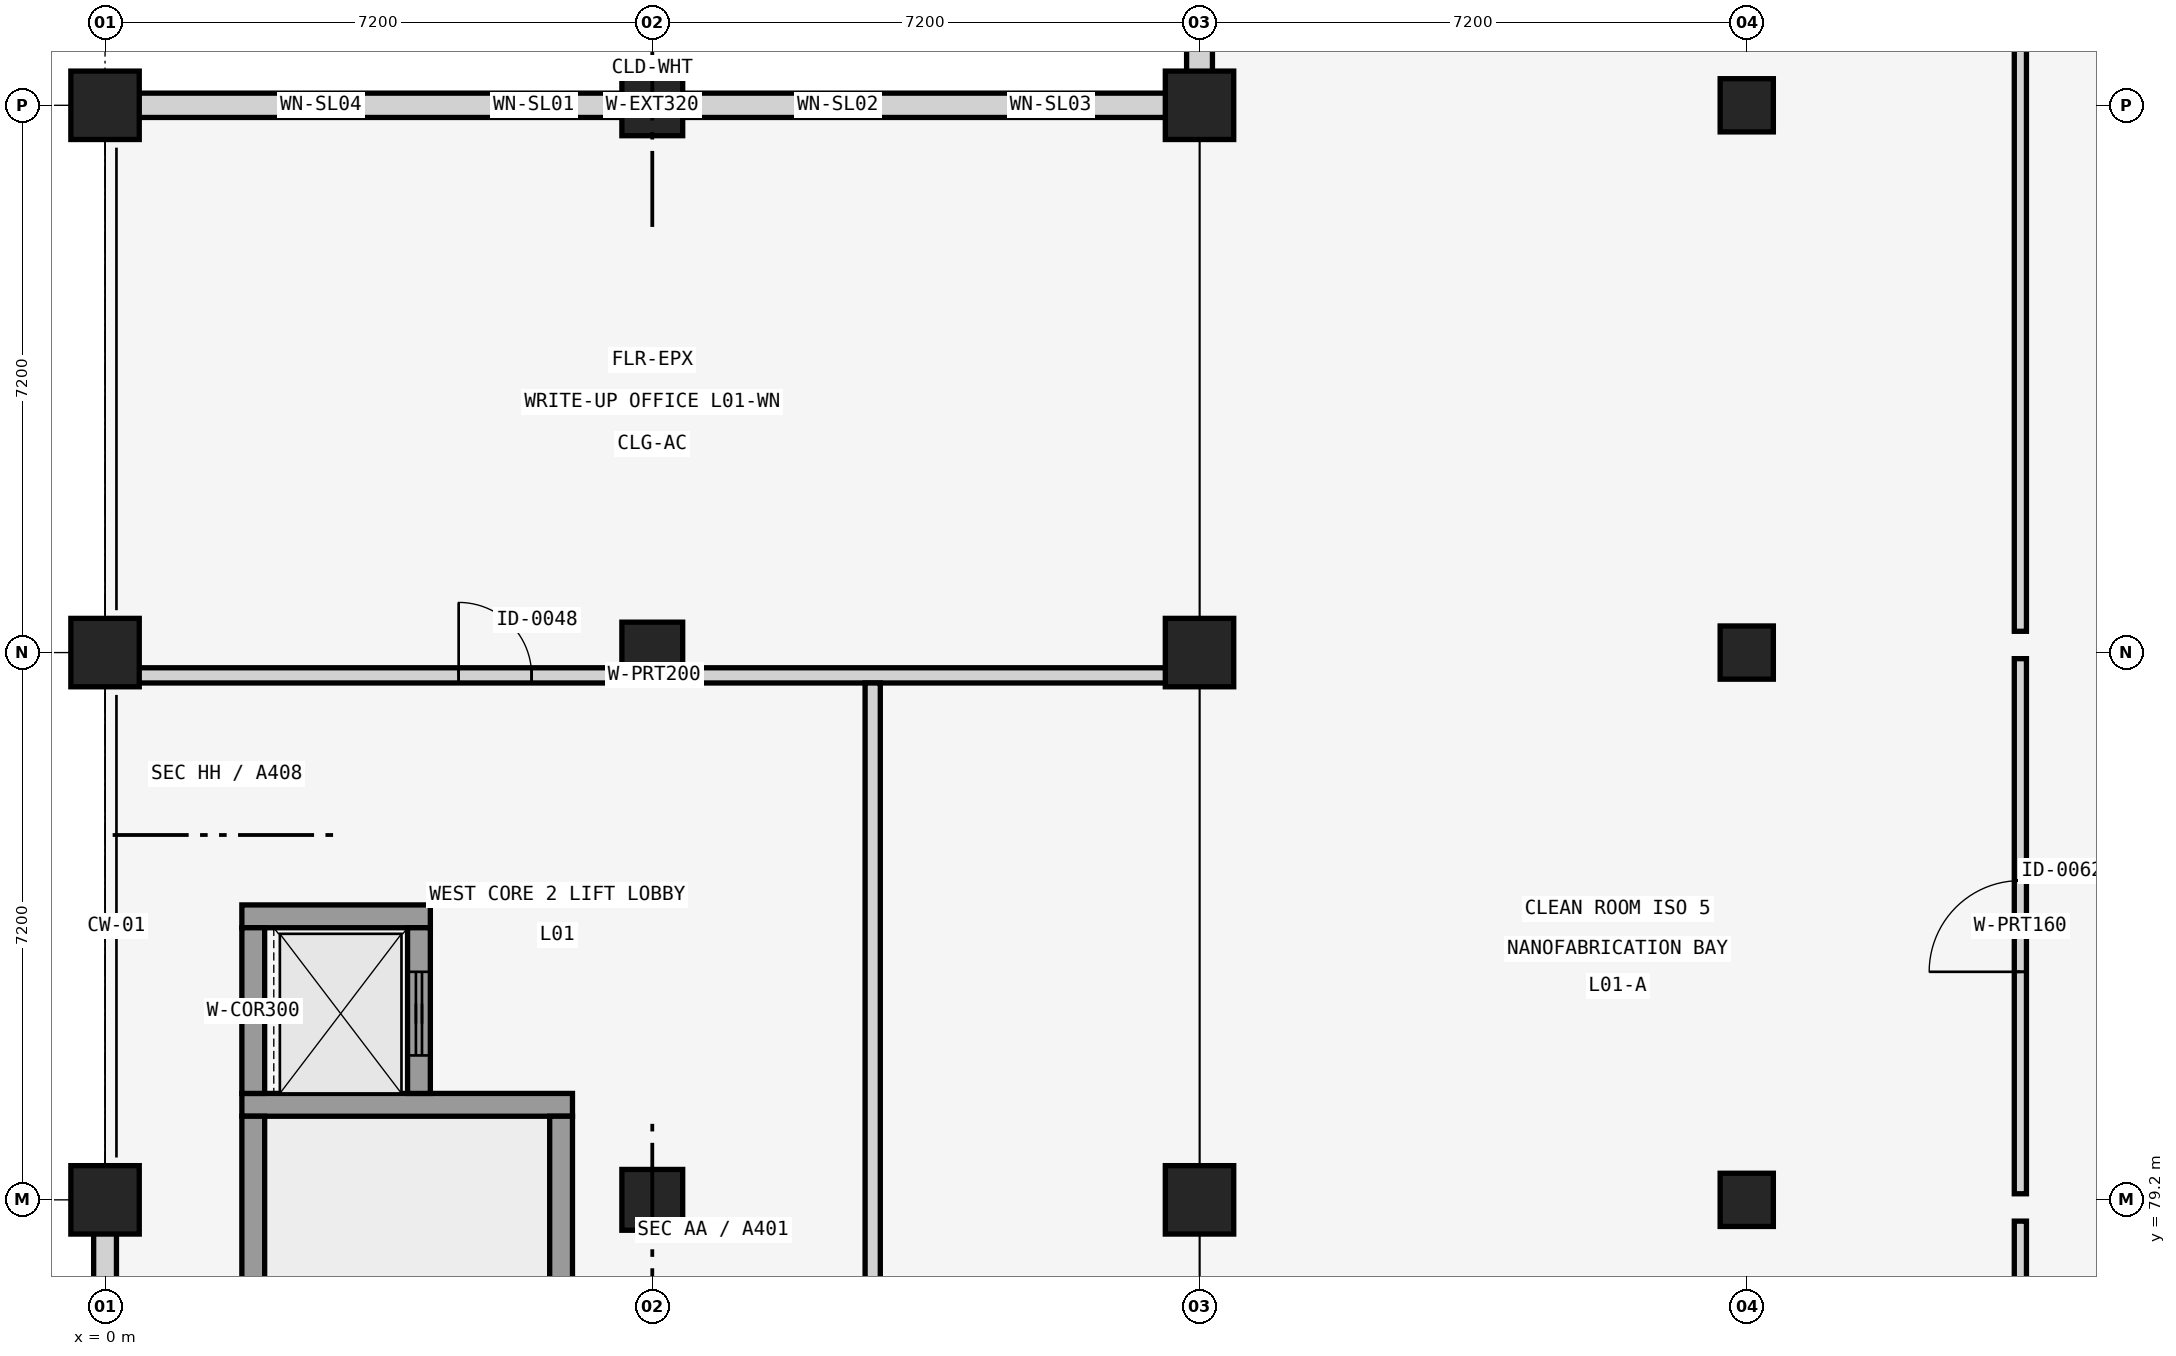
"""IFC4 building model, lengths in metres.
Left out: names, types, materials, properties, quantities, classifications, styles, units other than length and angle.
Written with IfcOpenShell. Run it as: python <this file> out.ifc"""

import sys

from ifc_helpers import new_model, si_unit, direction, frame, frame_2d, origin, origin_2d, place, context, subcontext, project, spatial, rectangle, extrude, element, fill, save


model = new_model("IFC4")
c1 = context("Model", 3, precision=1e-05, world=origin(), true_north=direction((0.0, 1.0)))
c2 = subcontext(c1, "Body", "Model", "MODEL_VIEW")
j1 = project(units=[si_unit("LENGTHUNIT", "METRE"), si_unit("PLANEANGLEUNIT", "RADIAN")], contexts=[c1])
p1 = place(None, origin())
s1 = spatial("IfcSite", under=j1, at=p1, CompositionType="ELEMENT")
p2 = place(p1, origin())
s2 = spatial("IfcBuilding", under=s1, at=p2, CompositionType="ELEMENT")
p3 = place(p2, frame((0.0, 0.0, 4.8)))
s3 = spatial("IfcBuildingStorey", under=s2, at=p3, CompositionType="ELEMENT", Elevation=4.8)
for number, where, z_axis, x_axis in (
    (1, (0.0, 79.2, 0.0), (0.0, 0.0, 1.0), (1.0, 0.0, 0.0)),
    (2, (0.0, 86.4, 0.0), (0.0, 0.0, 1.0), (1.0, 0.0, 0.0)),
    (3, (0.0, 93.6, 0.0), (0.0, 0.0, 1.0), (1.0, 0.0, 0.0)),
):
    element("IfcColumn", number, at=place(p3, frame(where, z_axis=z_axis, x_axis=x_axis)), inside=s3, PredefinedType="COLUMN", context=c2, shape_type="SweptSolid", body=[
        extrude(rectangle(XDim=0.9, YDim=0.9, at=origin_2d()), origin(), (0.0, 0.0, 1.0), 4.16),
    ])
for number, where, z_axis, x_axis in (
    (4, (7.2, 79.2, 0.0), (0.0, 0.0, 1.0), (1.0, 0.0, 0.0)),
    (5, (7.2, 86.4, 0.0), (0.0, 0.0, 1.0), (1.0, 0.0, 0.0)),
    (6, (7.2, 93.6, 0.0), (0.0, 0.0, 1.0), (1.0, 0.0, 0.0)),
):
    element("IfcColumn", number, at=place(p3, frame(where, z_axis=z_axis, x_axis=x_axis)), inside=s3, PredefinedType="COLUMN", context=c2, shape_type="SweptSolid", body=[
        extrude(rectangle(XDim=0.8, YDim=0.8, at=origin_2d()), origin(), (0.0, 0.0, 1.0), 4.16),
    ])
for number, where, z_axis, x_axis in (
    (7, (14.4, 79.2, 0.0), (0.0, 0.0, 1.0), (1.0, 0.0, 0.0)),
    (8, (14.4, 86.4, 0.0), (0.0, 0.0, 1.0), (1.0, 0.0, 0.0)),
    (9, (14.4, 93.6, 0.0), (0.0, 0.0, 1.0), (1.0, 0.0, 0.0)),
):
    element("IfcColumn", number, at=place(p3, frame(where, z_axis=z_axis, x_axis=x_axis)), inside=s3, PredefinedType="COLUMN", context=c2, shape_type="SweptSolid", body=[
        extrude(rectangle(XDim=0.9, YDim=0.9, at=origin_2d()), origin(), (0.0, 0.0, 1.0), 4.16),
    ])
for number, where, z_axis, x_axis in (
    (10, (21.6, 79.2, 0.0), (0.0, 0.0, 1.0), (1.0, 0.0, 0.0)),
    (11, (21.6, 86.4, 0.0), (0.0, 0.0, 1.0), (1.0, 0.0, 0.0)),
    (12, (21.6, 93.6, 0.0), (0.0, 0.0, 1.0), (1.0, 0.0, 0.0)),
):
    element("IfcColumn", number, at=place(p3, frame(where, z_axis=z_axis, x_axis=x_axis)), inside=s3, PredefinedType="COLUMN", context=c2, shape_type="SweptSolid", body=[
        extrude(rectangle(XDim=0.7, YDim=0.7, at=origin_2d()), origin(), (0.0, 0.0, 1.0), 4.16),
    ])
p4 = place(p3, frame((0.44, 93.6, 0.0), z_axis=(0.0, 0.0, 1.0), x_axis=(1.0, 0.0, 0.0)))
e13 = element("IfcWall", 13, at=p4, inside=s3, PredefinedType="SOLIDWALL", context=c2, shape_type="SweptSolid", body=[
    extrude(rectangle(XDim=13.52, YDim=0.32, at=frame_2d((6.76, 0.0))), origin(), (0.0, 0.0, 1.0), 3.42),
])
p5 = place(p4, frame((2.175, 0.0, 0.85)))
e14 = element("IfcOpeningElement", 14, at=p5, cuts=e13, PredefinedType="OPENING", context=c2, shape_type="SweptSolid", body=[
    extrude(rectangle(XDim=0.45, YDim=2.1, at=frame_2d((0.225, 1.05))), frame((0.0, 0.17, 0.0), z_axis=(0.0, -1.0, 0.0), x_axis=(1.0, 0.0, 0.0)), (0.0, 0.0, 1.0), 0.34),
])
p6 = place(p4, frame((4.975, 0.0, 0.85)))
e15 = element("IfcOpeningElement", 15, at=p6, cuts=e13, PredefinedType="OPENING", context=c2, shape_type="SweptSolid", body=[
    extrude(rectangle(XDim=0.45, YDim=2.4, at=frame_2d((0.225, 1.2))), frame((0.0, 0.17, 0.0), z_axis=(0.0, -1.0, 0.0), x_axis=(1.0, 0.0, 0.0)), (0.0, 0.0, 1.0), 0.34),
])
p7 = place(p4, frame((8.95, 0.0, 0.85)))
e16 = element("IfcOpeningElement", 16, at=p7, cuts=e13, PredefinedType="OPENING", context=c2, shape_type="SweptSolid", body=[
    extrude(rectangle(XDim=0.5, YDim=2.4, at=frame_2d((0.25, 1.2))), frame((0.0, 0.17, 0.0), z_axis=(0.0, -1.0, 0.0), x_axis=(1.0, 0.0, 0.0)), (0.0, 0.0, 1.0), 0.34),
])
p8 = place(p4, frame((11.725, 0.0, 0.85)))
e17 = element("IfcOpeningElement", 17, at=p8, cuts=e13, PredefinedType="OPENING", context=c2, shape_type="SweptSolid", body=[
    extrude(rectangle(XDim=0.55, YDim=2.2, at=frame_2d((0.275, 1.1))), frame((0.0, 0.17, 0.0), z_axis=(0.0, -1.0, 0.0), x_axis=(1.0, 0.0, 0.0)), (0.0, 0.0, 1.0), 0.34),
])
p9 = place(p3, frame((0.0, 72.44, 0.0), z_axis=(0.0, 0.0, 1.0), x_axis=(0.0, 1.0, 0.0)))
e18 = element("IfcWall", 18, at=p9, inside=s3, PredefinedType="SOLIDWALL", context=c2, shape_type="SweptSolid", body=[
    extrude(rectangle(XDim=6.32, YDim=0.3, at=frame_2d((3.16, 0.0))), origin(), (0.0, 0.0, 1.0), 3.21),
])
p10 = place(p9, frame((2.935, 0.0, 0.65)))
e19 = element("IfcOpeningElement", 19, at=p10, cuts=e18, PredefinedType="OPENING", context=c2, shape_type="SweptSolid", body=[
    extrude(rectangle(XDim=0.45, YDim=2.4, at=frame_2d((0.225, 1.2))), frame((0.0, 0.16, 0.0), z_axis=(0.0, -1.0, 0.0), x_axis=(1.0, 0.0, 0.0)), (0.0, 0.0, 1.0), 0.32),
])
p11 = place(p3, frame((14.4, 94.04, 0.0), z_axis=(0.0, 0.0, 1.0), x_axis=(0.0, 1.0, 0.0)))
e20 = element("IfcWall", 20, at=p11, inside=s3, PredefinedType="SOLIDWALL", context=c2, shape_type="SweptSolid", body=[
    extrude(rectangle(XDim=6.42, YDim=0.34, at=frame_2d((3.21, 0.0))), origin(), (0.0, 0.0, 1.0), 3.21),
])
p12 = place(p11, frame((0.598, 0.0, 1.0)))
e21 = element("IfcOpeningElement", 21, at=p12, cuts=e20, PredefinedType="OPENING", context=c2, shape_type="SweptSolid", body=[
    extrude(rectangle(XDim=2.4, YDim=1.5, at=frame_2d((1.2, 0.75))), frame((0.0, 0.18, 0.0), z_axis=(0.0, -1.0, 0.0), x_axis=(1.0, 0.0, 0.0)), (0.0, 0.0, 1.0), 0.36),
])
p13 = place(p11, frame((3.872, 0.0, 1.0)))
e22 = element("IfcOpeningElement", 22, at=p13, cuts=e20, PredefinedType="OPENING", context=c2, shape_type="SweptSolid", body=[
    extrude(rectangle(XDim=1.5, YDim=1.65, at=frame_2d((0.75, 0.825))), frame((0.0, 0.18, 0.0), z_axis=(0.0, -1.0, 0.0), x_axis=(1.0, 0.0, 0.0)), (0.0, 0.0, 1.0), 0.36),
])
p14 = place(p3, frame((1.8, 80.45, 0.0), z_axis=(0.0, 0.0, 1.0), x_axis=(1.0, 0.0, 0.0)))
e23 = element("IfcWall", 23, at=p14, inside=s3, PredefinedType="SHEAR", context=c2, shape_type="SweptSolid", body=[
    extrude(rectangle(XDim=4.35, YDim=0.3, at=frame_2d((2.175, 0.0))), origin(), (0.0, 0.0, 1.0), 3.81),
])
p15 = place(p3, frame((1.95, 72.5, 0.0), z_axis=(0.0, 0.0, 1.0), x_axis=(0.0, 1.0, 0.0)))
e24 = element("IfcWall", 24, at=p15, inside=s3, PredefinedType="SHEAR", context=c2, shape_type="SweptSolid", body=[
    extrude(rectangle(XDim=7.8, YDim=0.3, at=frame_2d((3.9, 0.0))), origin(), (0.0, 0.0, 1.0), 3.81),
])
p16 = place(p3, frame((6.0, 72.5, 0.0), z_axis=(0.0, 0.0, 1.0), x_axis=(0.0, 1.0, 0.0)))
e25 = element("IfcWall", 25, at=p16, inside=s3, PredefinedType="SHEAR", context=c2, shape_type="SweptSolid", body=[
    extrude(rectangle(XDim=7.8, YDim=0.3, at=frame_2d((3.9, 0.0))), origin(), (0.0, 0.0, 1.0), 3.81),
])
p17 = place(p16, frame((0.4, 0.0, 0.0)))
e26 = element("IfcOpeningElement", 26, at=p17, cuts=e25, PredefinedType="OPENING", context=c2, shape_type="SweptSolid", body=[
    extrude(rectangle(XDim=1.15, YDim=2.2, at=frame_2d((0.575, 1.1))), frame((0.0, 0.16, 0.0), z_axis=(0.0, -1.0, 0.0), x_axis=(1.0, 0.0, 0.0)), (0.0, 0.0, 1.0), 0.32),
])
p18 = place(p3, frame((1.8, 82.93, 0.0), z_axis=(0.0, 0.0, 1.0), x_axis=(1.0, 0.0, 0.0)))
e27 = element("IfcWall", 27, at=p18, inside=s3, PredefinedType="SHEAR", context=c2, shape_type="SweptSolid", body=[
    extrude(rectangle(XDim=2.48, YDim=0.3, at=frame_2d((1.24, 0.0))), origin(), (0.0, 0.0, 1.0), 3.81),
])
p19 = place(p3, frame((1.95, 80.6, 0.0), z_axis=(0.0, 0.0, 1.0), x_axis=(0.0, 1.0, 0.0)))
e28 = element("IfcWall", 28, at=p19, inside=s3, PredefinedType="SHEAR", context=c2, shape_type="SweptSolid", body=[
    extrude(rectangle(XDim=2.18, YDim=0.3, at=frame_2d((1.09, 0.0))), origin(), (0.0, 0.0, 1.0), 3.81),
])
p20 = place(p3, frame((4.13, 80.6, 0.0), z_axis=(0.0, 0.0, 1.0), x_axis=(0.0, 1.0, 0.0)))
e29 = element("IfcWall", 29, at=p20, inside=s3, PredefinedType="SHEAR", context=c2, shape_type="SweptSolid", body=[
    extrude(rectangle(XDim=2.18, YDim=0.3, at=frame_2d((1.09, 0.0))), origin(), (0.0, 0.0, 1.0), 3.81),
])
p21 = place(p20, frame((0.5, 0.0, 0.0)))
e30 = element("IfcOpeningElement", 30, at=p21, cuts=e29, PredefinedType="OPENING", context=c2, shape_type="SweptSolid", body=[
    extrude(rectangle(XDim=1.1, YDim=2.2, at=frame_2d((0.55, 1.1))), frame((0.0, 0.16, 0.0), z_axis=(0.0, -1.0, 0.0), x_axis=(1.0, 0.0, 0.0)), (0.0, 0.0, 1.0), 0.32),
])
p22 = place(p3, frame((0.25, 86.1, 0.0), z_axis=(0.0, 0.0, 1.0), x_axis=(1.0, 0.0, 0.0)))
e31 = element("IfcWall", 31, at=p22, inside=s3, PredefinedType="PARTITIONING", context=c2, shape_type="SweptSolid", body=[
    extrude(rectangle(XDim=13.95, YDim=0.2, at=frame_2d((6.975, 0.0))), origin(), (0.0, 0.0, 1.0), 3.21),
])
p23 = place(p22, frame((4.403, 0.0, 0.0)))
e32 = element("IfcOpeningElement", 32, at=p23, cuts=e31, PredefinedType="OPENING", context=c2, shape_type="SweptSolid", body=[
    extrude(rectangle(XDim=0.96, YDim=2.15, at=frame_2d((0.48, 1.075))), frame((0.0, 0.11, 0.0), z_axis=(0.0, -1.0, 0.0), x_axis=(1.0, 0.0, 0.0)), (0.0, 0.0, 1.0), 0.22),
])
p24 = place(p3, frame((10.1, 68.275, 0.0), z_axis=(0.0, 0.0, 1.0), x_axis=(0.0, 1.0, 0.0)))
e33 = element("IfcWall", 33, at=p24, inside=s3, PredefinedType="PARTITIONING", context=c2, shape_type="SweptSolid", body=[
    extrude(rectangle(XDim=17.725, YDim=0.2, at=frame_2d((8.863, 0.0))), origin(), (0.0, 0.0, 1.0), 3.21),
])
p25 = place(p24, frame((7.988, 0.0, 0.0)))
e34 = element("IfcOpeningElement", 34, at=p25, cuts=e33, PredefinedType="OPENING", context=c2, shape_type="SweptSolid", body=[
    extrude(rectangle(XDim=1.75, YDim=2.25, at=frame_2d((0.875, 1.125))), frame((0.0, 0.11, 0.0), z_axis=(0.0, -1.0, 0.0), x_axis=(1.0, 0.0, 0.0)), (0.0, 0.0, 1.0), 0.22),
])
p26 = place(p3, frame((25.2, 65.18, 0.0), z_axis=(0.0, 0.0, 1.0), x_axis=(0.0, 1.0, 0.0)))
e35 = element("IfcWall", 35, at=p26, inside=s3, PredefinedType="PARTITIONING", context=c2, shape_type="SweptSolid", body=[
    extrude(rectangle(XDim=13.74, YDim=0.16, at=frame_2d((6.87, 0.0))), origin(), (0.0, 0.0, 1.0), 3.11),
])
p27 = place(p26, frame((6.37, 0.0, 0.0)))
e36 = element("IfcOpeningElement", 36, at=p27, cuts=e35, PredefinedType="OPENING", context=c2, shape_type="SweptSolid", body=[
    extrude(rectangle(XDim=1.0, YDim=2.15, at=frame_2d((0.5, 1.075))), frame((0.0, 0.09, 0.0), z_axis=(0.0, -1.0, 0.0), x_axis=(1.0, 0.0, 0.0)), (0.0, 0.0, 1.0), 0.18),
])
p28 = place(p3, frame((25.2, 79.28, 0.0), z_axis=(0.0, 0.0, 1.0), x_axis=(0.0, 1.0, 0.0)))
e37 = element("IfcWall", 37, at=p28, inside=s3, PredefinedType="PARTITIONING", context=c2, shape_type="SweptSolid", body=[
    extrude(rectangle(XDim=7.04, YDim=0.16, at=frame_2d((3.52, 0.0))), origin(), (0.0, 0.0, 1.0), 3.11),
])
p29 = place(p28, frame((2.92, 0.0, 0.0)))
e38 = element("IfcOpeningElement", 38, at=p29, cuts=e37, PredefinedType="OPENING", context=c2, shape_type="SweptSolid", body=[
    extrude(rectangle(XDim=1.2, YDim=2.15, at=frame_2d((0.6, 1.075))), frame((0.0, 0.09, 0.0), z_axis=(0.0, -1.0, 0.0), x_axis=(1.0, 0.0, 0.0)), (0.0, 0.0, 1.0), 0.18),
])
p30 = place(p3, frame((25.2, 86.68, 0.0), z_axis=(0.0, 0.0, 1.0), x_axis=(0.0, 1.0, 0.0)))
e39 = element("IfcWall", 39, at=p30, inside=s3, PredefinedType="PARTITIONING", context=c2, shape_type="SweptSolid", body=[
    extrude(rectangle(XDim=21.15, YDim=0.16, at=frame_2d((10.575, 0.0))), origin(), (0.0, 0.0, 1.0), 3.11),
])
p31 = place(p30, frame((9.9, 0.0, 0.0)))
e40 = element("IfcOpeningElement", 40, at=p31, cuts=e39, PredefinedType="OPENING", context=c2, shape_type="SweptSolid", body=[
    extrude(rectangle(XDim=1.35, YDim=2.2, at=frame_2d((0.675, 1.1))), frame((0.0, 0.09, 0.0), z_axis=(0.0, -1.0, 0.0), x_axis=(1.0, 0.0, 0.0)), (0.0, 0.0, 1.0), 0.18),
])
p32 = place(p5, origin())
e41 = element("IfcWindow", 41, at=p32, inside=s3, PartitioningType="SINGLE_PANEL", PredefinedType="WINDOW", context=c2, shape_type="SweptSolid", body=[
    extrude(rectangle(XDim=0.45, YDim=2.1, at=frame_2d((0.225, 1.05))), frame((0.0, 0.03, 0.0), z_axis=(0.0, -1.0, 0.0), x_axis=(1.0, 0.0, 0.0)), (0.0, 0.0, 1.0), 0.06),
])
fill(e14, e41)
p33 = place(p6, origin())
e42 = element("IfcWindow", 42, at=p33, inside=s3, PartitioningType="SINGLE_PANEL", PredefinedType="WINDOW", context=c2, shape_type="SweptSolid", body=[
    extrude(rectangle(XDim=0.45, YDim=2.4, at=frame_2d((0.225, 1.2))), frame((0.0, 0.03, 0.0), z_axis=(0.0, -1.0, 0.0), x_axis=(1.0, 0.0, 0.0)), (0.0, 0.0, 1.0), 0.06),
])
fill(e15, e42)
p34 = place(p7, origin())
e43 = element("IfcWindow", 43, at=p34, inside=s3, PartitioningType="SINGLE_PANEL", PredefinedType="WINDOW", context=c2, shape_type="SweptSolid", body=[
    extrude(rectangle(XDim=0.5, YDim=2.4, at=frame_2d((0.25, 1.2))), frame((0.0, 0.03, 0.0), z_axis=(0.0, -1.0, 0.0), x_axis=(1.0, 0.0, 0.0)), (0.0, 0.0, 1.0), 0.06),
])
fill(e16, e43)
p35 = place(p8, origin())
e44 = element("IfcWindow", 44, at=p35, inside=s3, PartitioningType="SINGLE_PANEL", PredefinedType="WINDOW", context=c2, shape_type="SweptSolid", body=[
    extrude(rectangle(XDim=0.55, YDim=2.2, at=frame_2d((0.275, 1.1))), frame((0.0, 0.03, 0.0), z_axis=(0.0, -1.0, 0.0), x_axis=(1.0, 0.0, 0.0)), (0.0, 0.0, 1.0), 0.06),
])
fill(e17, e44)
p36 = place(p21, origin())
e45 = element("IfcDoor", 45, at=p36, inside=s3, OperationType="SLIDING_TO_LEFT", PredefinedType="DOOR", context=c2, shape_type="SweptSolid", body=[
    extrude(rectangle(XDim=1.1, YDim=2.2, at=frame_2d((0.55, 1.1))), frame((0.0, 0.025, 0.0), z_axis=(0.0, -1.0, 0.0), x_axis=(1.0, 0.0, 0.0)), (0.0, 0.0, 1.0), 0.05),
])
fill(e30, e45)
p37 = place(p23, origin())
e46 = element("IfcDoor", 46, at=p37, inside=s3, OperationType="SINGLE_SWING_LEFT", PredefinedType="DOOR", context=c2, shape_type="SweptSolid", body=[
    extrude(rectangle(XDim=0.96, YDim=2.15, at=frame_2d((0.48, 1.075))), frame((0.0, 0.025, 0.0), z_axis=(0.0, -1.0, 0.0), x_axis=(1.0, 0.0, 0.0)), (0.0, 0.0, 1.0), 0.05),
])
fill(e32, e46)
p38 = place(p29, origin())
e47 = element("IfcDoor", 47, at=p38, inside=s3, OperationType="SINGLE_SWING_LEFT", PredefinedType="DOOR", context=c2, shape_type="SweptSolid", body=[
    extrude(rectangle(XDim=1.2, YDim=2.15, at=frame_2d((0.6, 1.075))), frame((0.0, 0.025, 0.0), z_axis=(0.0, -1.0, 0.0), x_axis=(1.0, 0.0, 0.0)), (0.0, 0.0, 1.0), 0.05),
])
fill(e38, e47)
save(model, sys.argv[1])
